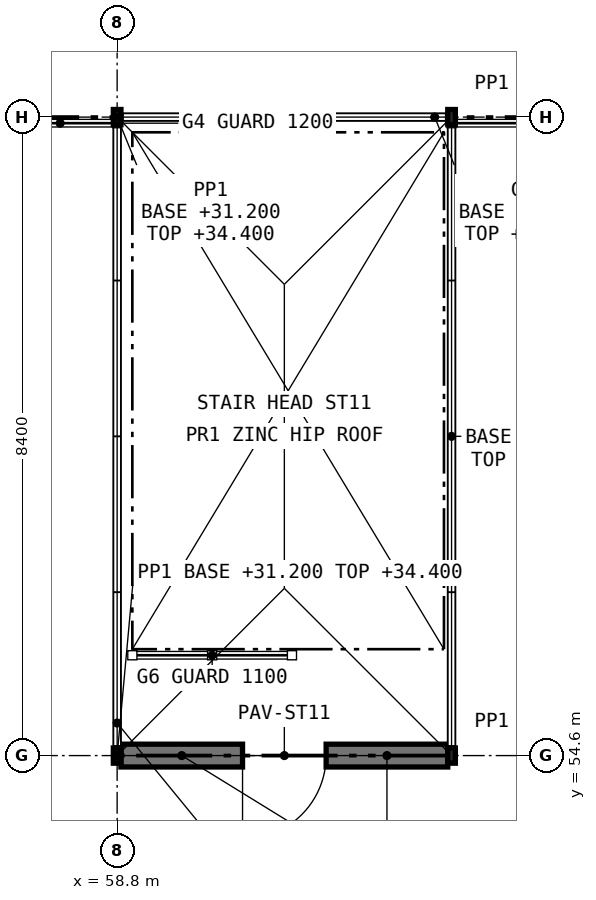
"""IFC4 building model, lengths in metres.
Left out: names, types, materials, properties, quantities, classifications, styles, units other than length and angle.
Written with IfcOpenShell. Run it as: python <this file> out.ifc"""

import sys

from ifc_helpers import new_model, si_unit, direction, frame, frame_2d, origin, origin_2d, place, context, subcontext, project, spatial, rectangle, hollow_rectangle, extrude, element, fill, save


model = new_model("IFC4")
c1 = context("Model", 3, precision=1e-05, world=origin(), true_north=direction((0.0, 1.0)))
c2 = subcontext(c1, "Body", "Model", "MODEL_VIEW")
j1 = project(units=[si_unit("LENGTHUNIT", "METRE"), si_unit("PLANEANGLEUNIT", "RADIAN")], contexts=[c1])
p1 = place(None, origin())
s1 = spatial("IfcSite", under=j1, at=p1, CompositionType="ELEMENT")
p2 = place(p1, origin())
s2 = spatial("IfcBuilding", under=s1, at=p2, CompositionType="ELEMENT")
p3 = place(p2, frame((0.0, 0.0, 31.2)))
s3 = spatial("IfcBuildingStorey", under=s2, at=p3, CompositionType="ELEMENT", Elevation=31.2)
p4 = place(p3, frame((58.8, 63.0, 0.0), z_axis=(0.0, 0.0, 1.0), x_axis=(1.0, 0.0, 0.0)))
e1 = element("IfcColumn", 1, at=p4, inside=s3, PredefinedType="COLUMN", context=c2, shape_type="SweptSolid", body=[
    extrude(hollow_rectangle(XDim=0.1, YDim=0.2, WallThickness=0.008, at=origin_2d()), origin(), (0.0, 0.0, 1.0), 3.2),
])
p5 = place(p3, frame((63.2, 63.0, -0.2), z_axis=(0.0, 0.0, 1.0), x_axis=(1.0, 0.0, 0.0)))
e2 = element("IfcColumn", 2, at=p5, inside=s3, PredefinedType="COLUMN", context=c2, shape_type="SweptSolid", body=[
    extrude(hollow_rectangle(XDim=0.1, YDim=0.2, WallThickness=0.008, at=origin_2d()), origin(), (0.0, 0.0, 1.0), 3.4),
])
p6 = place(p3, frame((58.8, 54.6, 0.0), z_axis=(0.0, 0.0, 1.0), x_axis=(1.0, 0.0, 0.0)))
e3 = element("IfcColumn", 3, at=p6, inside=s3, PredefinedType="COLUMN", context=c2, shape_type="SweptSolid", body=[
    extrude(hollow_rectangle(XDim=0.1, YDim=0.2, WallThickness=0.008, at=origin_2d()), origin(), (0.0, 0.0, 1.0), 3.2),
])
p7 = place(p3, frame((63.2, 54.6, -0.2), z_axis=(0.0, 0.0, 1.0), x_axis=(1.0, 0.0, 0.0)))
e4 = element("IfcColumn", 4, at=p7, inside=s3, PredefinedType="COLUMN", context=c2, shape_type="SweptSolid", body=[
    extrude(hollow_rectangle(XDim=0.1, YDim=0.2, WallThickness=0.008, at=origin_2d()), origin(), (0.0, 0.0, 1.0), 3.4),
])
p8 = place(p3, frame((58.85, 54.6, 0.0), z_axis=(0.0, 0.0, 1.0), x_axis=(1.0, 0.0, 0.0)))
e5 = element("IfcWall", 5, at=p8, inside=s3, PredefinedType="STANDARD", context=c2, shape_type="SweptSolid", body=[
    extrude(rectangle(XDim=4.3, YDim=0.3, at=frame_2d((2.15, 0.0))), origin(), (0.0, 0.0, 1.0), 3.2),
])
p9 = place(p8, frame((1.6, 0.0, 0.0)))
e6 = element("IfcOpeningElement", 6, at=p9, cuts=e5, PredefinedType="OPENING", context=c2, shape_type="SweptSolid", body=[
    extrude(rectangle(XDim=1.1, YDim=2.1, at=frame_2d((0.55, 1.05))), frame((0.0, 0.16, 0.0), z_axis=(0.0, -1.0, 0.0), x_axis=(1.0, 0.0, 0.0)), (0.0, 0.0, 1.0), 0.32),
])
p10 = place(p9, frame((1.1, 0.0, 0.0), z_axis=(0.0, 0.0, 1.0), x_axis=(-1.0, 0.0, 0.0)))
e7 = element("IfcDoor", 7, at=p10, inside=s3, OperationType="SINGLE_SWING_RIGHT", PredefinedType="DOOR", context=c2, shape_type="SweptSolid", body=[
    extrude(rectangle(XDim=1.1, YDim=2.1, at=frame_2d((0.55, 1.05))), frame((0.0, 0.025, 0.0), z_axis=(0.0, -1.0, 0.0), x_axis=(1.0, 0.0, 0.0)), (0.0, 0.0, 1.0), 0.05),
])
fill(e6, e7)
save(model, sys.argv[1])
